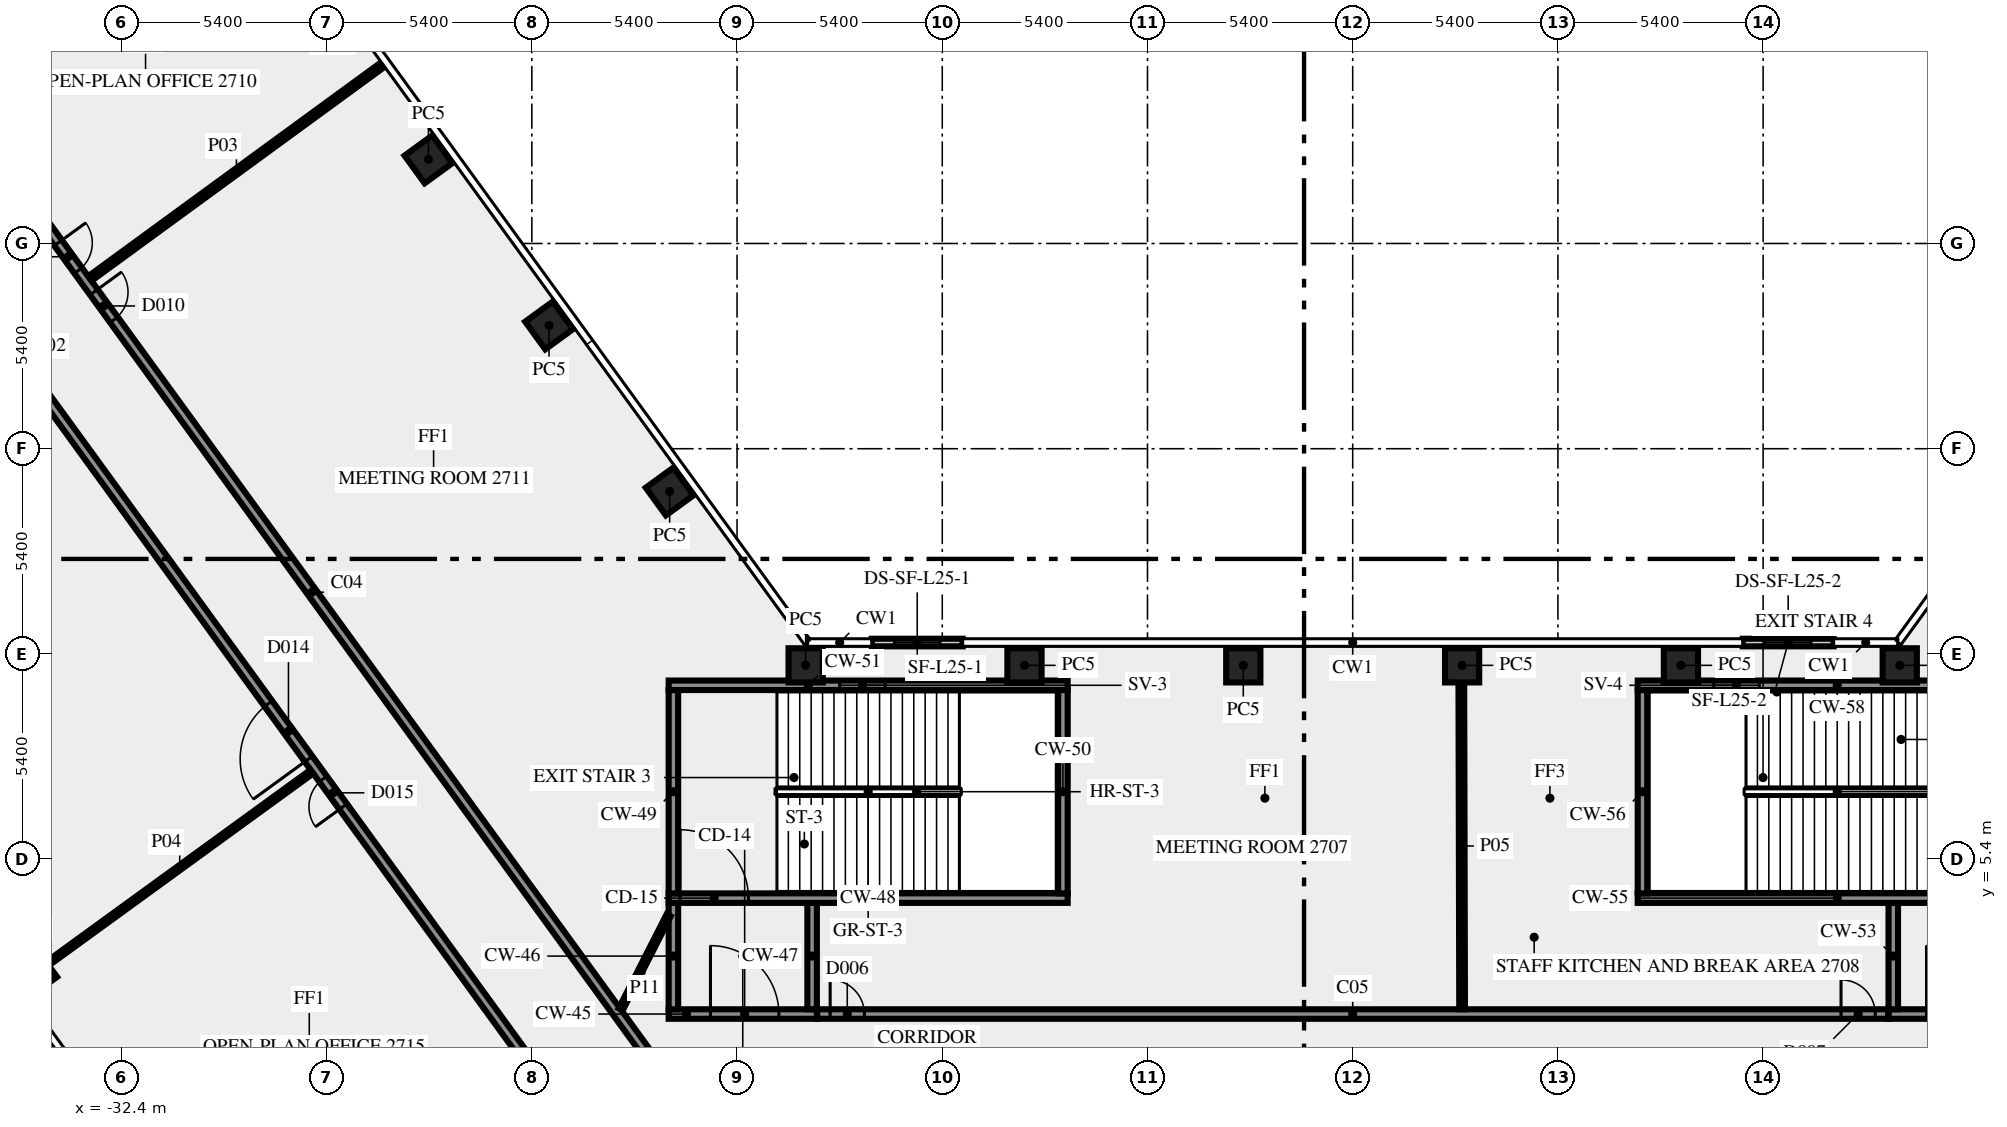
"""IFC4 building model, lengths in metres.
Left out: names, types, materials, properties, quantities, classifications, styles, units other than length and angle.
Written with IfcOpenShell. Run it as: python <this file> out.ifc"""

import sys

from ifc_helpers import new_model, si_unit, direction, frame, frame_2d, origin, origin_2d, place, context, subcontext, project, spatial, rectangle, extrude, element, fill, save


model = new_model("IFC4")
c1 = context("Model", 3, precision=1e-05, world=origin(), true_north=direction((0.0, 1.0)))
c2 = subcontext(c1, "Body", "Model", "MODEL_VIEW")
j1 = project(units=[si_unit("LENGTHUNIT", "METRE"), si_unit("PLANEANGLEUNIT", "RADIAN")], contexts=[c1])
p1 = place(None, origin())
s1 = spatial("IfcSite", under=j1, at=p1, CompositionType="ELEMENT")
p2 = place(p1, origin())
s2 = spatial("IfcBuilding", under=s1, at=p2, CompositionType="ELEMENT")
p3 = place(p2, frame((0.0, 0.0, 117.0)))
s3 = spatial("IfcBuildingStorey", under=s2, at=p3, CompositionType="ELEMENT", Elevation=117.0)
for number, where, z_axis, x_axis in (
    (1, (-17.974, 15.075, 0.0), (0.0, 0.0, 1.0), (-0.588, 0.809, 0.0)),
    (2, (-21.147, 19.444, 0.0), (0.0, 0.0, 1.0), (-0.588, 0.809, 0.0)),
    (3, (-24.321, 23.812, 0.0), (0.0, 0.0, 1.0), (-0.588, 0.809, 0.0)),
    (4, (-34.722, 2.4, 0.0), (0.0, 0.0, 1.0), (0.588, -0.809, 0.0)),
    (5, (14.395, 10.5, 0.0), (0.0, 0.0, 1.0), (-1.0, 0.0, 0.0)),
    (6, (8.637, 10.5, 0.0), (0.0, 0.0, 1.0), (-1.0, 0.0, 0.0)),
    (7, (2.879, 10.5, 0.0), (0.0, 0.0, 1.0), (-1.0, 0.0, 0.0)),
    (8, (-2.879, 10.5, 0.0), (0.0, 0.0, 1.0), (-1.0, 0.0, 0.0)),
    (9, (-8.637, 10.5, 0.0), (0.0, 0.0, 1.0), (-1.0, 0.0, 0.0)),
    (10, (-14.395, 10.5, 0.0), (0.0, 0.0, 1.0), (-1.0, 0.0, 0.0)),
):
    element("IfcColumn", number, at=place(p3, frame(where, z_axis=z_axis, x_axis=x_axis)), inside=s3, PredefinedType="COLUMN", context=c2, shape_type="SweptSolid", body=[
        extrude(rectangle(XDim=0.9, YDim=0.9, at=origin_2d()), origin(), (0.0, 0.0, 1.0), 3.65),
    ])
p4 = place(p3, frame((12.655, 11.1, 0.0), z_axis=(0.0, 0.0, 1.0), x_axis=(-1.0, 0.0, 0.0)))
e11 = element("IfcWall", 11, at=p4, inside=s3, PredefinedType="SOLIDWALL", context=c2, shape_type="SweptSolid", body=[
    extrude(rectangle(XDim=2.392, YDim=0.2, at=frame_2d((1.196, 0.0))), origin(), (0.0, 0.0, 1.0), 3.65),
])
p5 = place(p4, frame((0.596, 0.0, 1.0)))
e12 = element("IfcOpeningElement", 12, at=p5, cuts=e11, PredefinedType="OPENING", context=c2, shape_type="SweptSolid", body=[
    extrude(rectangle(XDim=1.2, YDim=1.2, at=frame_2d((0.6, 0.6))), frame((0.0, 0.11, 0.0), z_axis=(0.0, -1.0, 0.0), x_axis=(1.0, 0.0, 0.0)), (0.0, 0.0, 1.0), 0.22),
])
p6 = place(p3, frame((-10.263, 11.1, 0.0), z_axis=(0.0, 0.0, 1.0), x_axis=(-1.0, 0.0, 0.0)))
e13 = element("IfcWall", 13, at=p6, inside=s3, PredefinedType="SOLIDWALL", context=c2, shape_type="SweptSolid", body=[
    extrude(rectangle(XDim=2.392, YDim=0.2, at=frame_2d((1.196, 0.0))), origin(), (0.0, 0.0, 1.0), 3.65),
])
p7 = place(p6, frame((0.596, 0.0, 1.0)))
e14 = element("IfcOpeningElement", 14, at=p7, cuts=e13, PredefinedType="OPENING", context=c2, shape_type="SweptSolid", body=[
    extrude(rectangle(XDim=1.2, YDim=1.2, at=frame_2d((0.6, 0.6))), frame((0.0, 0.11, 0.0), z_axis=(0.0, -1.0, 0.0), x_axis=(1.0, 0.0, 0.0)), (0.0, 0.0, 1.0), 0.22),
])
p8 = place(p3, frame((-18.0, 1.325, 0.0), z_axis=(0.0, 0.0, 1.0), x_axis=(1.0, 0.0, 0.0)))
e15 = element("IfcWall", 15, at=p8, inside=s3, PredefinedType="SHEAR", context=c2, shape_type="SweptSolid", body=[
    extrude(rectangle(XDim=3.9, YDim=0.25, at=frame_2d((1.95, 0.0))), origin(), (0.0, 0.0, 1.0), 3.65),
])
p9 = place(p8, frame((1.1, 0.0, 0.0)))
e16 = element("IfcOpeningElement", 16, at=p9, cuts=e15, PredefinedType="OPENING", context=c2, shape_type="SweptSolid", body=[
    extrude(rectangle(XDim=1.8, YDim=2.1, at=frame_2d((0.9, 1.05))), frame((0.0, 0.135, 0.0), z_axis=(0.0, -1.0, 0.0), x_axis=(1.0, 0.0, 0.0)), (0.0, 0.0, 1.0), 0.27),
])
for number, where, z_axis, x_axis in (
    (17, (-17.875, 1.45, 0.0), (0.0, 0.0, 1.0), (0.0, 1.0, 0.0)),
    (18, (-14.225, 1.45, 0.0), (0.0, 0.0, 1.0), (0.0, 1.0, 0.0)),
):
    element("IfcWall", number, at=place(p3, frame(where, z_axis=z_axis, x_axis=x_axis)), inside=s3, PredefinedType="SHEAR", context=c2, shape_type="SweptSolid", body=[
        extrude(rectangle(XDim=2.8, YDim=0.25, at=frame_2d((1.4, 0.0))), origin(), (0.0, 0.0, 1.0), 3.65),
    ])
p10 = place(p3, frame((-18.0, 4.375, 0.0), z_axis=(0.0, 0.0, 1.0), x_axis=(1.0, 0.0, 0.0)))
e19 = element("IfcWall", 19, at=p10, inside=s3, PredefinedType="SHEAR", context=c2, shape_type="SweptSolid", body=[
    extrude(rectangle(XDim=10.5, YDim=0.25, at=frame_2d((5.25, 0.0))), origin(), (0.0, 0.0, 1.0), 3.65),
])
p11 = place(p10, frame((0.3, 0.0, 0.0)))
e20 = element("IfcOpeningElement", 20, at=p11, cuts=e19, PredefinedType="OPENING", context=c2, shape_type="SweptSolid", body=[
    extrude(rectangle(XDim=1.8, YDim=2.1, at=frame_2d((0.9, 1.05))), frame((0.0, 0.135, 0.0), z_axis=(0.0, -1.0, 0.0), x_axis=(1.0, 0.0, 0.0)), (0.0, 0.0, 1.0), 0.27),
])
for number, where, z_axis, x_axis in (
    (21, (-17.875, 4.5, 0.0), (0.0, 0.0, 1.0), (0.0, 1.0, 0.0)),
    (22, (-7.625, 4.5, 0.0), (0.0, 0.0, 1.0), (0.0, 1.0, 0.0)),
):
    element("IfcWall", number, at=place(p3, frame(where, z_axis=z_axis, x_axis=x_axis)), inside=s3, PredefinedType="SHEAR", context=c2, shape_type="SweptSolid", body=[
        extrude(rectangle(XDim=5.35, YDim=0.25, at=frame_2d((2.675, 0.0))), origin(), (0.0, 0.0, 1.0), 3.65),
    ])
p12 = place(p3, frame((-18.0, 9.975, 0.0), z_axis=(0.0, 0.0, 1.0), x_axis=(1.0, 0.0, 0.0)))
e23 = element("IfcWall", 23, at=p12, inside=s3, PredefinedType="SHEAR", context=c2, shape_type="SweptSolid", body=[
    extrude(rectangle(XDim=10.5, YDim=0.25, at=frame_2d((5.25, 0.0))), origin(), (0.0, 0.0, 1.0), 3.65),
])
p13 = place(p12, frame((4.5, 0.0, 1.0)))
e24 = element("IfcOpeningElement", 24, at=p13, cuts=e23, PredefinedType="OPENING", context=c2, shape_type="SweptSolid", body=[
    extrude(rectangle(XDim=1.2, YDim=1.2, at=frame_2d((0.6, 0.6))), frame((0.0, 0.135, 0.0), z_axis=(0.0, -1.0, 0.0), x_axis=(1.0, 0.0, 0.0)), (0.0, 0.0, 1.0), 0.27),
])
p14 = place(p3, frame((14.1, 1.325, 0.0), z_axis=(0.0, 0.0, 1.0), x_axis=(1.0, 0.0, 0.0)))
e25 = element("IfcWall", 25, at=p14, inside=s3, PredefinedType="SHEAR", context=c2, shape_type="SweptSolid", body=[
    extrude(rectangle(XDim=3.9, YDim=0.25, at=frame_2d((1.95, 0.0))), origin(), (0.0, 0.0, 1.0), 3.65),
])
p15 = place(p14, frame((1.0, 0.0, 0.0)))
e26 = element("IfcOpeningElement", 26, at=p15, cuts=e25, PredefinedType="OPENING", context=c2, shape_type="SweptSolid", body=[
    extrude(rectangle(XDim=1.8, YDim=2.1, at=frame_2d((0.9, 1.05))), frame((0.0, 0.135, 0.0), z_axis=(0.0, -1.0, 0.0), x_axis=(1.0, 0.0, 0.0)), (0.0, 0.0, 1.0), 0.27),
])
p16 = place(p3, frame((14.225, 1.45, 0.0), z_axis=(0.0, 0.0, 1.0), x_axis=(0.0, 1.0, 0.0)))
e27 = element("IfcWall", 27, at=p16, inside=s3, PredefinedType="SHEAR", context=c2, shape_type="SweptSolid", body=[
    extrude(rectangle(XDim=2.8, YDim=0.25, at=frame_2d((1.4, 0.0))), origin(), (0.0, 0.0, 1.0), 3.65),
])
p17 = place(p3, frame((7.5, 4.375, 0.0), z_axis=(0.0, 0.0, 1.0), x_axis=(1.0, 0.0, 0.0)))
e28 = element("IfcWall", 28, at=p17, inside=s3, PredefinedType="SHEAR", context=c2, shape_type="SweptSolid", body=[
    extrude(rectangle(XDim=10.5, YDim=0.25, at=frame_2d((5.25, 0.0))), origin(), (0.0, 0.0, 1.0), 3.65),
])
p18 = place(p17, frame((8.4, 0.0, 0.0)))
e29 = element("IfcOpeningElement", 29, at=p18, cuts=e28, PredefinedType="OPENING", context=c2, shape_type="SweptSolid", body=[
    extrude(rectangle(XDim=1.8, YDim=2.1, at=frame_2d((0.9, 1.05))), frame((0.0, 0.135, 0.0), z_axis=(0.0, -1.0, 0.0), x_axis=(1.0, 0.0, 0.0)), (0.0, 0.0, 1.0), 0.27),
])
p19 = place(p3, frame((7.625, 4.5, 0.0), z_axis=(0.0, 0.0, 1.0), x_axis=(0.0, 1.0, 0.0)))
e30 = element("IfcWall", 30, at=p19, inside=s3, PredefinedType="SHEAR", context=c2, shape_type="SweptSolid", body=[
    extrude(rectangle(XDim=5.35, YDim=0.25, at=frame_2d((2.675, 0.0))), origin(), (0.0, 0.0, 1.0), 3.65),
])
p20 = place(p3, frame((7.5, 9.975, 0.0), z_axis=(0.0, 0.0, 1.0), x_axis=(1.0, 0.0, 0.0)))
e31 = element("IfcWall", 31, at=p20, inside=s3, PredefinedType="SHEAR", context=c2, shape_type="SweptSolid", body=[
    extrude(rectangle(XDim=10.5, YDim=0.25, at=frame_2d((5.25, 0.0))), origin(), (0.0, 0.0, 1.0), 3.65),
])
p21 = place(p20, frame((2.0, 0.0, 1.0)))
e32 = element("IfcOpeningElement", 32, at=p21, cuts=e31, PredefinedType="OPENING", context=c2, shape_type="SweptSolid", body=[
    extrude(rectangle(XDim=1.2, YDim=1.2, at=frame_2d((0.6, 0.6))), frame((0.0, 0.135, 0.0), z_axis=(0.0, -1.0, 0.0), x_axis=(1.0, 0.0, 0.0)), (0.0, 0.0, 1.0), 0.27),
])
p22 = place(p3, frame((-20.531, -1.523, 0.0), z_axis=(0.0, 0.0, 1.0), x_axis=(-0.587784522481, 0.809017524614, 0.0)))
e33 = element("IfcWall", 33, at=p22, inside=s3, PredefinedType="SOLIDWALL", context=c2, shape_type="SweptSolid", body=[
    extrude(rectangle(XDim=49.912, YDim=0.25, at=frame_2d((24.956, 0.0))), origin(), (0.0, 0.0, 1.0), 3.65),
])
p23 = place(p22, frame((10.266, 0.0, 0.0)))
e34 = element("IfcOpeningElement", 34, at=p23, cuts=e33, PredefinedType="OPENING", context=c2, shape_type="SweptSolid", body=[
    extrude(rectangle(XDim=0.9, YDim=2.1, at=frame_2d((0.45, 1.05))), frame((0.0, 0.135, 0.0), z_axis=(0.0, -1.0, 0.0), x_axis=(1.0, 0.0, 0.0)), (0.0, 0.0, 1.0), 0.27),
])
p24 = place(p22, frame((32.366, 0.0, 0.0)))
e35 = element("IfcOpeningElement", 35, at=p24, cuts=e33, PredefinedType="OPENING", context=c2, shape_type="SweptSolid", body=[
    extrude(rectangle(XDim=1.8, YDim=2.1, at=frame_2d((0.9, 1.05))), frame((0.0, 0.135, 0.0), z_axis=(0.0, -1.0, 0.0), x_axis=(1.0, 0.0, 0.0)), (0.0, 0.0, 1.0), 0.27),
])
p25 = place(p22, frame((11.815, 0.0, 0.0)))
e36 = element("IfcOpeningElement", 36, at=p25, cuts=e33, PredefinedType="OPENING", context=c2, shape_type="SweptSolid", body=[
    extrude(rectangle(XDim=1.8, YDim=2.1, at=frame_2d((0.9, 1.05))), frame((0.0, 0.135, 0.0), z_axis=(0.0, -1.0, 0.0), x_axis=(1.0, 0.0, 0.0)), (0.0, 0.0, 1.0), 0.27),
])
p26 = place(p22, frame((48.57, 0.0, 0.0)))
e37 = element("IfcOpeningElement", 37, at=p26, cuts=e33, PredefinedType="OPENING", context=c2, shape_type="SweptSolid", body=[
    extrude(rectangle(XDim=0.9, YDim=2.1, at=frame_2d((0.45, 1.05))), frame((0.0, 0.135, 0.0), z_axis=(0.0, -1.0, 0.0), x_axis=(1.0, 0.0, 0.0)), (0.0, 0.0, 1.0), 0.27),
])
p27 = place(p22, frame((35.915, 0.0, 0.0)))
e38 = element("IfcOpeningElement", 38, at=p27, cuts=e33, PredefinedType="OPENING", context=c2, shape_type="SweptSolid", body=[
    extrude(rectangle(XDim=0.9, YDim=2.1, at=frame_2d((0.45, 1.05))), frame((0.0, 0.135, 0.0), z_axis=(0.0, -1.0, 0.0), x_axis=(1.0, 0.0, 0.0)), (0.0, 0.0, 1.0), 0.27),
])
p28 = place(p3, frame((-37.232, 25.972, 0.0), z_axis=(0.0, 0.0, 1.0), x_axis=(0.587786323093, -0.809016216391, 0.0)))
e39 = element("IfcWall", 39, at=p28, inside=s3, PredefinedType="SOLIDWALL", context=c2, shape_type="SweptSolid", body=[
    extrude(rectangle(XDim=33.493, YDim=0.25, at=frame_2d((16.747, 0.0))), origin(), (0.0, 0.0, 1.0), 3.65),
])
p29 = place(p28, frame((5.385, 0.0, 0.0)))
e40 = element("IfcOpeningElement", 40, at=p29, cuts=e39, PredefinedType="OPENING", context=c2, shape_type="SweptSolid", body=[
    extrude(rectangle(XDim=0.9, YDim=2.1, at=frame_2d((0.45, 1.05))), frame((0.0, 0.135, 0.0), z_axis=(0.0, -1.0, 0.0), x_axis=(1.0, 0.0, 0.0)), (0.0, 0.0, 1.0), 0.27),
])
p30 = place(p28, frame((6.985, 0.0, 0.0)))
e41 = element("IfcOpeningElement", 41, at=p30, cuts=e39, PredefinedType="OPENING", context=c2, shape_type="SweptSolid", body=[
    extrude(rectangle(XDim=0.9, YDim=2.1, at=frame_2d((0.45, 1.05))), frame((0.0, 0.135, 0.0), z_axis=(0.0, -1.0, 0.0), x_axis=(1.0, 0.0, 0.0)), (0.0, 0.0, 1.0), 0.27),
])
p31 = place(p3, frame((-14.09, 1.325, 0.0), z_axis=(0.0, 0.0, 1.0), x_axis=(1.0, 0.0, 0.0)))
e42 = element("IfcWall", 42, at=p31, inside=s3, PredefinedType="SOLIDWALL", context=c2, shape_type="SweptSolid", body=[
    extrude(rectangle(XDim=28.18, YDim=0.25, at=frame_2d((14.09, 0.0))), origin(), (0.0, 0.0, 1.0), 3.65),
])
p32 = place(p31, frame((0.34, 0.0, 0.0)))
e43 = element("IfcOpeningElement", 43, at=p32, cuts=e42, PredefinedType="OPENING", context=c2, shape_type="SweptSolid", body=[
    extrude(rectangle(XDim=0.9, YDim=2.1, at=frame_2d((0.45, 1.05))), frame((0.0, 0.135, 0.0), z_axis=(0.0, -1.0, 0.0), x_axis=(1.0, 0.0, 0.0)), (0.0, 0.0, 1.0), 0.27),
])
p33 = place(p31, frame((26.94, 0.0, 0.0)))
e44 = element("IfcOpeningElement", 44, at=p33, cuts=e42, PredefinedType="OPENING", context=c2, shape_type="SweptSolid", body=[
    extrude(rectangle(XDim=0.9, YDim=2.1, at=frame_2d((0.45, 1.05))), frame((0.0, 0.135, 0.0), z_axis=(0.0, -1.0, 0.0), x_axis=(1.0, 0.0, 0.0)), (0.0, 0.0, 1.0), 0.27),
])
p34 = place(p3, frame((-33.23, 20.677, 0.0), z_axis=(0.0, 0.0, 1.0), x_axis=(0.807610282865, 0.589716568371, 0.0)))
e45 = element("IfcWall", 45, at=p34, inside=s3, PredefinedType="PARTITIONING", context=c2, shape_type="SweptSolid", body=[
    extrude(rectangle(XDim=9.55, YDim=0.15, at=frame_2d((4.775, 0.0))), origin(), (0.0, 0.0, 1.0), 2.75),
])
p35 = place(p3, frame((-27.389, 7.703, 0.0), z_axis=(0.0, 0.0, 1.0), x_axis=(-0.809052894195, -0.587735837256, 0.0)))
e46 = element("IfcWall", 46, at=p35, inside=s3, PredefinedType="PARTITIONING", context=c2, shape_type="SweptSolid", body=[
    extrude(rectangle(XDim=8.594, YDim=0.12, at=frame_2d((4.297, 0.0))), origin(), (0.0, 0.0, 1.0), 3.65),
])
p36 = place(p3, frame((2.879, 1.45, 0.0), z_axis=(0.0, 0.0, 1.0), x_axis=(-0.002357613104, 0.999997220826, 0.0)))
e47 = element("IfcWall", 47, at=p36, inside=s3, PredefinedType="PARTITIONING", context=c2, shape_type="SweptSolid", body=[
    extrude(rectangle(XDim=8.595, YDim=0.15, at=frame_2d((4.297, 0.0))), origin(), (0.0, 0.0, 1.0), 3.65),
])
p37 = place(p3, frame((-19.261, 1.45, 0.0), z_axis=(0.0, 0.0, 1.0), x_axis=(0.453950796792, 0.891026752736, 0.0)))
e48 = element("IfcWall", 48, at=p37, inside=s3, PredefinedType="PARTITIONING", context=c2, shape_type="SweptSolid", body=[
    extrude(rectangle(XDim=2.778, YDim=0.12, at=frame_2d((1.389, 0.0))), origin(), (0.0, 0.0, 1.0), 3.65),
])
p38 = place(p5, origin())
e49 = element("IfcWindow", 49, at=p38, inside=s3, PartitioningType="SINGLE_PANEL", PredefinedType="WINDOW", context=c2, shape_type="SweptSolid", body=[
    extrude(rectangle(XDim=1.2, YDim=1.2, at=frame_2d((0.6, 0.6))), frame((0.0, 0.03, 0.0), z_axis=(0.0, -1.0, 0.0), x_axis=(1.0, 0.0, 0.0)), (0.0, 0.0, 1.0), 0.06),
])
fill(e12, e49)
p39 = place(p7, origin())
e50 = element("IfcWindow", 50, at=p39, inside=s3, PartitioningType="SINGLE_PANEL", PredefinedType="WINDOW", context=c2, shape_type="SweptSolid", body=[
    extrude(rectangle(XDim=1.2, YDim=1.2, at=frame_2d((0.6, 0.6))), frame((0.0, 0.03, 0.0), z_axis=(0.0, -1.0, 0.0), x_axis=(1.0, 0.0, 0.0)), (0.0, 0.0, 1.0), 0.06),
])
fill(e14, e50)
p40 = place(p9, origin())
e51 = element("IfcDoor", 51, at=p40, inside=s3, OperationType="DOUBLE_DOOR_SINGLE_SWING", PredefinedType="DOOR", context=c2, shape_type="SweptSolid", body=[
    extrude(rectangle(XDim=1.8, YDim=2.1, at=frame_2d((0.9, 1.05))), frame((0.0, 0.025, 0.0), z_axis=(0.0, -1.0, 0.0), x_axis=(1.0, 0.0, 0.0)), (0.0, 0.0, 1.0), 0.05),
])
fill(e16, e51)
p41 = place(p11, origin())
e52 = element("IfcDoor", 52, at=p41, inside=s3, OperationType="DOUBLE_DOOR_SINGLE_SWING", PredefinedType="DOOR", context=c2, shape_type="SweptSolid", body=[
    extrude(rectangle(XDim=1.8, YDim=2.1, at=frame_2d((0.9, 1.05))), frame((0.0, 0.025, 0.0), z_axis=(0.0, -1.0, 0.0), x_axis=(1.0, 0.0, 0.0)), (0.0, 0.0, 1.0), 0.05),
])
fill(e20, e52)
p42 = place(p13, origin())
e53 = element("IfcWindow", 53, at=p42, inside=s3, PartitioningType="SINGLE_PANEL", PredefinedType="WINDOW", context=c2, shape_type="SweptSolid", body=[
    extrude(rectangle(XDim=1.2, YDim=1.2, at=frame_2d((0.6, 0.6))), frame((0.0, 0.03, 0.0), z_axis=(0.0, -1.0, 0.0), x_axis=(1.0, 0.0, 0.0)), (0.0, 0.0, 1.0), 0.06),
])
fill(e24, e53)
p43 = place(p15, origin())
e54 = element("IfcDoor", 54, at=p43, inside=s3, OperationType="DOUBLE_DOOR_SINGLE_SWING", PredefinedType="DOOR", context=c2, shape_type="SweptSolid", body=[
    extrude(rectangle(XDim=1.8, YDim=2.1, at=frame_2d((0.9, 1.05))), frame((0.0, 0.025, 0.0), z_axis=(0.0, -1.0, 0.0), x_axis=(1.0, 0.0, 0.0)), (0.0, 0.0, 1.0), 0.05),
])
fill(e26, e54)
p44 = place(p21, origin())
e55 = element("IfcWindow", 55, at=p44, inside=s3, PartitioningType="SINGLE_PANEL", PredefinedType="WINDOW", context=c2, shape_type="SweptSolid", body=[
    extrude(rectangle(XDim=1.2, YDim=1.2, at=frame_2d((0.6, 0.6))), frame((0.0, 0.03, 0.0), z_axis=(0.0, -1.0, 0.0), x_axis=(1.0, 0.0, 0.0)), (0.0, 0.0, 1.0), 0.06),
])
fill(e32, e55)
p45 = place(p29, origin())
e56 = element("IfcDoor", 56, at=p45, inside=s3, OperationType="SINGLE_SWING_RIGHT", PredefinedType="DOOR", context=c2, shape_type="SweptSolid", body=[
    extrude(rectangle(XDim=0.9, YDim=2.1, at=frame_2d((0.45, 1.05))), frame((0.0, 0.025, 0.0), z_axis=(0.0, -1.0, 0.0), x_axis=(1.0, 0.0, 0.0)), (0.0, 0.0, 1.0), 0.05),
])
fill(e40, e56)
p46 = place(p23, origin())
e57 = element("IfcDoor", 57, at=p46, inside=s3, OperationType="SINGLE_SWING_RIGHT", PredefinedType="DOOR", context=c2, shape_type="SweptSolid", body=[
    extrude(rectangle(XDim=0.9, YDim=2.1, at=frame_2d((0.45, 1.05))), frame((0.0, 0.025, 0.0), z_axis=(0.0, -1.0, 0.0), x_axis=(1.0, 0.0, 0.0)), (0.0, 0.0, 1.0), 0.05),
])
fill(e34, e57)
p47 = place(p32, origin())
e58 = element("IfcDoor", 58, at=p47, inside=s3, OperationType="SINGLE_SWING_LEFT", PredefinedType="DOOR", context=c2, shape_type="SweptSolid", body=[
    extrude(rectangle(XDim=0.9, YDim=2.1, at=frame_2d((0.45, 1.05))), frame((0.0, 0.025, 0.0), z_axis=(0.0, -1.0, 0.0), x_axis=(1.0, 0.0, 0.0)), (0.0, 0.0, 1.0), 0.05),
])
fill(e43, e58)
p48 = place(p30, origin())
e59 = element("IfcDoor", 59, at=p48, inside=s3, OperationType="SINGLE_SWING_LEFT", PredefinedType="DOOR", context=c2, shape_type="SweptSolid", body=[
    extrude(rectangle(XDim=0.9, YDim=2.1, at=frame_2d((0.45, 1.05))), frame((0.0, 0.025, 0.0), z_axis=(0.0, -1.0, 0.0), x_axis=(1.0, 0.0, 0.0)), (0.0, 0.0, 1.0), 0.05),
])
fill(e41, e59)
p49 = place(p25, origin())
e60 = element("IfcDoor", 60, at=p49, inside=s3, OperationType="DOUBLE_DOOR_SINGLE_SWING", PredefinedType="DOOR", context=c2, shape_type="SweptSolid", body=[
    extrude(rectangle(XDim=1.8, YDim=2.1, at=frame_2d((0.9, 1.05))), frame((0.0, 0.025, 0.0), z_axis=(0.0, -1.0, 0.0), x_axis=(1.0, 0.0, 0.0)), (0.0, 0.0, 1.0), 0.05),
])
fill(e36, e60)
p50 = place(p33, origin())
e61 = element("IfcDoor", 61, at=p50, inside=s3, OperationType="SINGLE_SWING_RIGHT", PredefinedType="DOOR", context=c2, shape_type="SweptSolid", body=[
    extrude(rectangle(XDim=0.9, YDim=2.1, at=frame_2d((0.45, 1.05))), frame((0.0, 0.025, 0.0), z_axis=(0.0, -1.0, 0.0), x_axis=(1.0, 0.0, 0.0)), (0.0, 0.0, 1.0), 0.05),
])
fill(e44, e61)
save(model, sys.argv[1])
